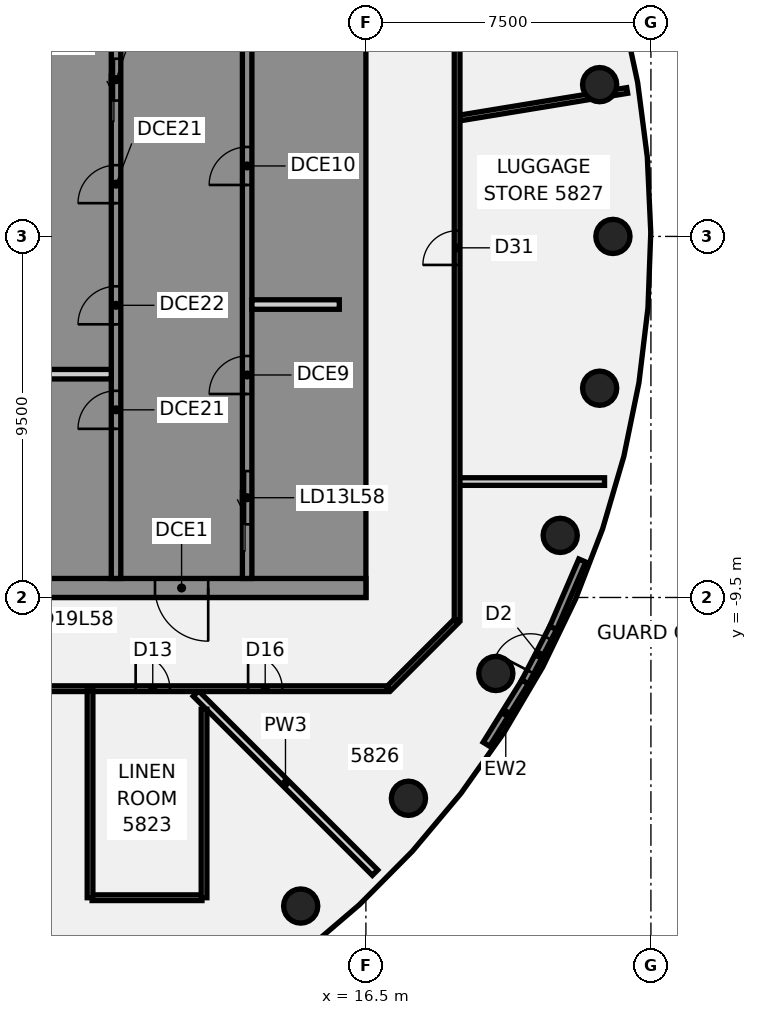
"""IFC4 building model, lengths in metres.
Left out: names, types, materials, properties, quantities, classifications, styles, units other than length and angle.
Written with IfcOpenShell. Run it as: python <this file> out.ifc"""

import sys

from ifc_helpers import new_model, si_unit, direction, frame, frame_2d, origin, origin_2d, place, context, subcontext, project, spatial, polyline, rectangle, circle, outline, extrude, element, fill, save


model = new_model("IFC4")
c1 = context("Model", 3, precision=1e-05, world=origin(), true_north=direction((0.0, 1.0)))
c2 = subcontext(c1, "Body", "Model", "MODEL_VIEW")
j1 = project(units=[si_unit("LENGTHUNIT", "METRE"), si_unit("PLANEANGLEUNIT", "RADIAN")], contexts=[c1])
p1 = place(None, origin())
s1 = spatial("IfcSite", under=j1, at=p1, CompositionType="ELEMENT")
p2 = place(p1, origin())
s2 = spatial("IfcBuilding", under=s1, at=p2, CompositionType="ELEMENT")
p3 = place(p2, frame((0.0, 0.0, 230.7)))
s3 = spatial("IfcBuildingStorey", under=s2, at=p3, CompositionType="ELEMENT", Elevation=230.7)
for number, where, z_axis, x_axis in (
    (1, (23.0, 0.0, -0.14), (0.0, 0.0, 1.0), (1.0, 0.0, 0.0)),
    (2, (22.651, 3.994, -0.14), (0.0, 0.0, 1.0), (1.0, 0.0, 0.0)),
    (3, (14.784, -17.619, -0.14), (0.0, 0.0, 1.0), (1.0, 0.0, 0.0)),
    (4, (17.619, -14.784, -0.14), (0.0, 0.0, 1.0), (1.0, 0.0, 0.0)),
    (5, (19.919, -11.5, -0.14), (0.0, 0.0, 1.0), (1.0, 0.0, 0.0)),
    (6, (21.613, -7.866, -0.14), (0.0, 0.0, 1.0), (1.0, 0.0, 0.0)),
    (7, (22.651, -3.994, -0.14), (0.0, 0.0, 1.0), (1.0, 0.0, 0.0)),
):
    element("IfcColumn", number, at=place(p3, frame(where, z_axis=z_axis, x_axis=x_axis)), inside=s3, PredefinedType="COLUMN", context=c2, shape_type="SweptSolid", body=[
        extrude(circle(Radius=0.45, at=origin_2d()), origin(), (0.0, 0.0, 1.0), 3.6),
    ])
p4 = place(p3, frame((12.027, -12.027, 0.0), z_axis=(0.0, 0.0, 1.0), x_axis=(0.707106781187, -0.707106781187, 0.0)))
e8 = element("IfcWall", 8, at=p4, inside=s3, PredefinedType="PARTITIONING", context=c2, shape_type="SweptSolid", body=[
    extrude(rectangle(XDim=6.665, YDim=0.2, at=frame_2d((3.333, 0.0))), origin(), (0.0, 0.0, 1.0), 2.864),
])
p5 = place(p3, frame((-17.1, -11.9, 0.0), z_axis=(0.0, 0.0, 1.0), x_axis=(1.0, 0.0, 0.0)))
e9 = element("IfcWall", 9, at=p5, inside=s3, PredefinedType="PARTITIONING", context=c2, shape_type="SweptSolid", body=[
    extrude(rectangle(XDim=34.165, YDim=0.15, at=frame_2d((17.083, 0.0))), origin(), (0.0, 0.0, 1.0), 2.864),
])
p6 = place(p5, frame((6.1, 0.0, 0.0)))
e10 = element("IfcOpeningElement", 10, at=p6, cuts=e9, PredefinedType="OPENING", context=c2, shape_type="SweptSolid", body=[
    extrude(rectangle(XDim=0.9, YDim=2.1, at=frame_2d((0.45, 1.05))), frame((0.0, 0.085, 0.0), z_axis=(0.0, -1.0, 0.0), x_axis=(1.0, 0.0, 0.0)), (0.0, 0.0, 1.0), 0.17),
])
p7 = place(p5, frame((27.541, 0.0, 0.0)))
e11 = element("IfcOpeningElement", 11, at=p7, cuts=e9, PredefinedType="OPENING", context=c2, shape_type="SweptSolid", body=[
    extrude(rectangle(XDim=0.9, YDim=2.1, at=frame_2d((0.45, 1.05))), frame((0.0, 0.085, 0.0), z_axis=(0.0, -1.0, 0.0), x_axis=(1.0, 0.0, 0.0)), (0.0, 0.0, 1.0), 0.17),
])
p8 = place(p5, frame((19.152, 0.0, 0.0)))
e12 = element("IfcOpeningElement", 12, at=p8, cuts=e9, PredefinedType="OPENING", context=c2, shape_type="SweptSolid", body=[
    extrude(rectangle(XDim=1.8, YDim=2.1, at=frame_2d((0.9, 1.05))), frame((0.0, 0.085, 0.0), z_axis=(0.0, -1.0, 0.0), x_axis=(1.0, 0.0, 0.0)), (0.0, 0.0, 1.0), 0.17),
])
p9 = place(p5, frame((10.359, 0.0, 0.0)))
e13 = element("IfcOpeningElement", 13, at=p9, cuts=e9, PredefinedType="OPENING", context=c2, shape_type="SweptSolid", body=[
    extrude(rectangle(XDim=1.8, YDim=2.1, at=frame_2d((0.9, 1.05))), frame((0.0, 0.085, 0.0), z_axis=(0.0, -1.0, 0.0), x_axis=(1.0, 0.0, 0.0)), (0.0, 0.0, 1.0), 0.17),
])
p10 = place(p5, frame((30.5, 0.0, 0.0)))
e14 = element("IfcOpeningElement", 14, at=p10, cuts=e9, PredefinedType="OPENING", context=c2, shape_type="SweptSolid", body=[
    extrude(rectangle(XDim=0.9, YDim=2.1, at=frame_2d((0.45, 1.05))), frame((0.0, 0.085, 0.0), z_axis=(0.0, -1.0, 0.0), x_axis=(1.0, 0.0, 0.0)), (0.0, 0.0, 1.0), 0.17),
])
p11 = place(p5, frame((1.65, 0.0, 0.0)))
e15 = element("IfcOpeningElement", 15, at=p11, cuts=e9, PredefinedType="OPENING", context=c2, shape_type="SweptSolid", body=[
    extrude(rectangle(XDim=0.9, YDim=2.1, at=frame_2d((0.45, 1.05))), frame((0.0, 0.085, 0.0), z_axis=(0.0, -1.0, 0.0), x_axis=(1.0, 0.0, 0.0)), (0.0, 0.0, 1.0), 0.17),
])
p12 = place(p3, frame((9.296, -17.4, 0.0), z_axis=(0.0, 0.0, 1.0), x_axis=(1.0, 0.0, 0.0)))
e16 = element("IfcWall", 16, at=p12, inside=s3, PredefinedType="PARTITIONING", context=c2, shape_type="SweptSolid", body=[
    extrude(rectangle(XDim=2.89, YDim=0.15, at=frame_2d((1.445, 0.0))), origin(), (0.0, 0.0, 1.0), 2.864),
])
p13 = place(p3, frame((18.955, -6.45, 0.0), z_axis=(0.0, 0.0, 1.0), x_axis=(1.0, 0.0, 0.0)))
e17 = element("IfcWall", 17, at=p13, inside=s3, PredefinedType="PARTITIONING", context=c2, shape_type="SweptSolid", body=[
    extrude(rectangle(XDim=3.825, YDim=0.2, at=frame_2d((1.912, 0.0))), origin(), (0.0, 0.0, 1.0), 2.864),
])
p14 = place(p3, frame((18.969, 3.116, 0.0), z_axis=(0.0, 0.0, 1.0), x_axis=(0.986773083394, 0.162107624401, 0.0)))
e18 = element("IfcWall", 18, at=p14, inside=s3, PredefinedType="PARTITIONING", context=c2, shape_type="SweptSolid", body=[
    extrude(rectangle(XDim=3.422, YDim=0.15, at=frame_2d((1.711, 0.0))), origin(), (0.0, 0.0, 1.0), 2.864),
])
p15 = place(p3, frame((23.055, 3.787, 0.0), z_axis=(0.0, 0.0, 1.0), x_axis=(0.98681781348, 0.161835110525, 0.0)))
e19 = element("IfcWall", 19, at=p15, inside=s3, PredefinedType="PARTITIONING", context=c2, shape_type="SweptSolid", body=[
    extrude(rectangle(XDim=0.324, YDim=0.15, at=frame_2d((0.162, 0.0))), origin(), (0.0, 0.0, 1.0), 2.864),
])
p16 = place(p3, frame((17.1, -11.9, 0.0), z_axis=(0.0, 0.0, 1.0), x_axis=(0.707106781187, 0.707106781187, 0.0)))
e20 = element("IfcWall", 20, at=p16, inside=s3, PredefinedType="PARTITIONING", context=c2, shape_type="SweptSolid", body=[
    extrude(rectangle(XDim=2.505, YDim=0.15, at=frame_2d((1.253, 0.0))), origin(), (0.0, 0.0, 1.0), 2.864),
])
p17 = place(p3, frame((9.241, -17.4, 0.0), z_axis=(0.0, 0.0, 1.0), x_axis=(0.0, 1.0, 0.0)))
e21 = element("IfcWall", 21, at=p17, inside=s3, PredefinedType="PARTITIONING", context=c2, shape_type="SweptSolid", body=[
    extrude(rectangle(XDim=5.445, YDim=0.15, at=frame_2d((2.722, 0.0))), origin(), (0.0, 0.0, 1.0), 2.864),
])
p18 = place(p3, frame((12.241, -17.4, 0.0), z_axis=(0.0, 0.0, 1.0), x_axis=(0.0, 1.0, 0.0)))
e22 = element("IfcWall", 22, at=p18, inside=s3, PredefinedType="PARTITIONING", context=c2, shape_type="SweptSolid", body=[
    extrude(rectangle(XDim=4.959, YDim=0.15, at=frame_2d((2.479, 0.0))), origin(), (0.0, 0.0, 1.0), 2.864),
])
p19 = place(p3, frame((18.9, -10.1, 0.0), z_axis=(0.0, 0.0, 1.0), x_axis=(0.0, 1.0, 0.0)))
e23 = element("IfcWall", 23, at=p19, inside=s3, PredefinedType="PARTITIONING", context=c2, shape_type="SweptSolid", body=[
    extrude(rectangle(XDim=20.2, YDim=0.15, at=frame_2d((10.1, 0.0))), origin(), (0.0, 0.0, 1.0), 2.864),
])
p20 = place(p19, frame((9.35, 0.0, 0.0)))
e24 = element("IfcOpeningElement", 24, at=p20, cuts=e23, PredefinedType="OPENING", context=c2, shape_type="SweptSolid", body=[
    extrude(rectangle(XDim=0.9, YDim=2.1, at=frame_2d((0.45, 1.05))), frame((0.0, 0.085, 0.0), z_axis=(0.0, -1.0, 0.0), x_axis=(1.0, 0.0, 0.0)), (0.0, 0.0, 1.0), 0.17),
])
p21 = place(p3, frame((19.67, -13.362, 0.0), z_axis=(0.0, 0.0, 1.0), x_axis=(0.527567207866, 0.84951329665, 0.0)))
e25 = element("IfcWall", 25, at=p21, inside=s3, PredefinedType="SOLIDWALL", context=c2, shape_type="SweptSolid", body=[
    extrude(rectangle(XDim=1.933, YDim=0.2, at=frame_2d((0.966, 0.0))), origin(), (0.0, 0.0, 1.0), 3.46),
])
p22 = place(p3, frame((21.428, -10.302, 0.0), z_axis=(0.0, 0.0, 1.0), x_axis=(0.396281143068, 0.918129215116, 0.0)))
e26 = element("IfcWall", 26, at=p22, inside=s3, PredefinedType="SOLIDWALL", context=c2, shape_type="SweptSolid", body=[
    extrude(rectangle(XDim=1.933, YDim=0.2, at=frame_2d((0.966, 0.0))), origin(), (0.0, 0.0, 1.0), 3.46),
])
p23 = place(p3, frame((20.69, -11.72, 0.0), z_axis=(0.0, 0.0, 1.0), x_axis=(0.461328695654, 0.887229302135, 0.0)))
e27 = element("IfcWall", 27, at=p23, inside=s3, PredefinedType="SOLIDWALL", context=c2, shape_type="SweptSolid", body=[
    extrude(rectangle(XDim=1.599, YDim=0.2, at=frame_2d((0.799, 0.0))), origin(), (0.0, 0.0, 1.0), 3.46),
])
p24 = place(p23, frame((0.299, 0.0, 0.0)))
e28 = element("IfcOpeningElement", 28, at=p24, cuts=e27, PredefinedType="OPENING", context=c2, shape_type="SweptSolid", body=[
    extrude(rectangle(XDim=1.0, YDim=2.4, at=frame_2d((0.5, 1.2))), frame((0.0, 0.11, 0.0), z_axis=(0.0, -1.0, 0.0), x_axis=(1.0, 0.0, 0.0)), (0.0, 0.0, 1.0), 0.22),
])
p25 = place(p3, frame((16.5, -9.25, 0.0), z_axis=(0.0, 0.0, 1.0), x_axis=(-1.0, 0.0, 0.0)))
e29 = element("IfcWall", 29, at=p25, inside=s3, PredefinedType="SHEAR", context=c2, shape_type="SweptSolid", body=[
    extrude(rectangle(XDim=13.0, YDim=0.5, at=frame_2d((6.5, 0.0))), origin(), (0.0, 0.0, 1.0), 3.46),
])
p26 = place(p25, frame((4.15, 0.0, 0.0)))
e30 = element("IfcOpeningElement", 30, at=p26, cuts=e29, PredefinedType="OPENING", context=c2, shape_type="SweptSolid", body=[
    extrude(rectangle(XDim=1.4, YDim=2.1, at=frame_2d((0.7, 1.05))), frame((0.0, 0.26, 0.0), z_axis=(0.0, -1.0, 0.0), x_axis=(1.0, 0.0, 0.0)), (0.0, 0.0, 1.0), 0.52),
])
p27 = place(p25, frame((10.125, 0.0, 0.0)))
e31 = element("IfcOpeningElement", 31, at=p27, cuts=e29, PredefinedType="OPENING", context=c2, shape_type="SweptSolid", body=[
    extrude(rectangle(XDim=1.4, YDim=2.1, at=frame_2d((0.7, 1.05))), frame((0.0, 0.26, 0.0), z_axis=(0.0, -1.0, 0.0), x_axis=(1.0, 0.0, 0.0)), (0.0, 0.0, 1.0), 0.52),
])
p28 = place(p3, origin())
e32 = element("IfcWall", 32, at=p28, inside=s3, PredefinedType="SHEAR", context=c2, shape_type="SweptSolid", body=[
    extrude(outline(polyline([(13.5, -8.125), (13.5, -9.0), (16.0, -9.0), (16.5, -9.0), (16.5, 9.0), (16.0, 9.0), (13.5, 9.0), (13.5, 8.125), (16.0, 8.125), (16.0, 5.625), (13.5, 5.625), (13.5, 5.375), (16.0, 5.375), (16.0, -5.375), (13.5, -5.375), (13.5, -5.625), (16.0, -5.625), (16.0, -8.125), (13.5, -8.125)])), origin(), (0.0, 0.0, 1.0), 3.46),
])
p29 = place(p3, origin())
e33 = element("IfcWall", 33, at=p29, inside=s3, PredefinedType="SHEAR", context=c2, shape_type="SweptSolid", body=[
    extrude(outline(polyline([(9.8, -5.375), (7.5, -5.375), (7.5, 2.625), (9.8, 2.625), (9.8, 2.875), (7.5, 2.875), (7.5, 5.375), (9.8, 5.375), (9.8, 5.625), (7.5, 5.625), (7.5, 8.125), (9.8, 8.125), (9.8, 9.0), (7.5, 9.0), (7.25, 9.0), (7.25, -5.625), (7.5, -5.625), (9.8, -5.625), (9.8, -5.375)])), origin(), (0.0, 0.0, 1.0), 3.46),
])
p30 = place(p3, origin())
e34 = element("IfcWall", 34, at=p30, inside=s3, PredefinedType="SHEAR", context=c2, shape_type="SweptSolid", body=[
    extrude(outline(polyline([(7.5, -8.125), (7.5, -9.0), (9.8, -9.0), (9.8, -8.125), (9.8, -5.625), (9.55, -5.625), (9.55, -8.125), (7.5, -8.125)])), origin(), (0.0, 0.0, 1.0), 3.46),
])
p31 = place(p3, frame((13.375, -9.0, 0.0), z_axis=(0.0, 0.0, 1.0), x_axis=(0.0, 1.0, 0.0)))
e35 = element("IfcWall", 35, at=p31, inside=s3, PredefinedType="SHEAR", context=c2, shape_type="SweptSolid", body=[
    extrude(rectangle(XDim=18.0, YDim=0.25, at=frame_2d((9.0, 0.0))), origin(), (0.0, 0.0, 1.0), 3.46),
])
p32 = place(p31, frame((1.425, 0.0, 0.0)))
e36 = element("IfcOpeningElement", 36, at=p32, cuts=e35, PredefinedType="OPENING", context=c2, shape_type="SweptSolid", body=[
    extrude(rectangle(XDim=1.4, YDim=2.1, at=frame_2d((0.7, 1.05))), frame((0.0, 0.135, 0.0), z_axis=(0.0, -1.0, 0.0), x_axis=(1.0, 0.0, 0.0)), (0.0, 0.0, 1.0), 0.27),
])
p33 = place(p31, frame((4.854, 0.0, 0.0)))
e37 = element("IfcOpeningElement", 37, at=p33, cuts=e35, PredefinedType="OPENING", context=c2, shape_type="SweptSolid", body=[
    extrude(rectangle(XDim=1.0, YDim=2.1, at=frame_2d((0.5, 1.05))), frame((0.0, 0.135, 0.0), z_axis=(0.0, -1.0, 0.0), x_axis=(1.0, 0.0, 0.0)), (0.0, 0.0, 1.0), 0.27),
])
p34 = place(p31, frame((10.354, 0.0, 0.0)))
e38 = element("IfcOpeningElement", 38, at=p34, cuts=e35, PredefinedType="OPENING", context=c2, shape_type="SweptSolid", body=[
    extrude(rectangle(XDim=1.0, YDim=2.1, at=frame_2d((0.5, 1.05))), frame((0.0, 0.135, 0.0), z_axis=(0.0, -1.0, 0.0), x_axis=(1.0, 0.0, 0.0)), (0.0, 0.0, 1.0), 0.27),
])
p35 = place(p3, frame((9.925, -9.0, 0.0), z_axis=(0.0, 0.0, 1.0), x_axis=(0.0, 1.0, 0.0)))
e39 = element("IfcWall", 39, at=p35, inside=s3, PredefinedType="SHEAR", context=c2, shape_type="SweptSolid", body=[
    extrude(rectangle(XDim=18.0, YDim=0.25, at=frame_2d((9.0, 0.0))), origin(), (0.0, 0.0, 1.0), 3.46),
])
p36 = place(p35, frame((12.575, 0.0, 0.0)))
e40 = element("IfcOpeningElement", 40, at=p36, cuts=e39, PredefinedType="OPENING", context=c2, shape_type="SweptSolid", body=[
    extrude(rectangle(XDim=1.1, YDim=2.1, at=frame_2d((0.55, 1.05))), frame((0.0, 0.135, 0.0), z_axis=(0.0, -1.0, 0.0), x_axis=(1.0, 0.0, 0.0)), (0.0, 0.0, 1.0), 0.27),
])
p37 = place(p35, frame((15.325, 0.0, 0.0)))
e41 = element("IfcOpeningElement", 41, at=p37, cuts=e39, PredefinedType="OPENING", context=c2, shape_type="SweptSolid", body=[
    extrude(rectangle(XDim=1.1, YDim=2.1, at=frame_2d((0.55, 1.05))), frame((0.0, 0.135, 0.0), z_axis=(0.0, -1.0, 0.0), x_axis=(1.0, 0.0, 0.0)), (0.0, 0.0, 1.0), 0.27),
])
p38 = place(p35, frame((3.938, 0.0, 0.0)))
e42 = element("IfcOpeningElement", 42, at=p38, cuts=e39, PredefinedType="OPENING", context=c2, shape_type="SweptSolid", body=[
    extrude(rectangle(XDim=1.0, YDim=2.1, at=frame_2d((0.5, 1.05))), frame((0.0, 0.135, 0.0), z_axis=(0.0, -1.0, 0.0), x_axis=(1.0, 0.0, 0.0)), (0.0, 0.0, 1.0), 0.27),
])
p39 = place(p35, frame((6.688, 0.0, 0.0)))
e43 = element("IfcOpeningElement", 43, at=p39, cuts=e39, PredefinedType="OPENING", context=c2, shape_type="SweptSolid", body=[
    extrude(rectangle(XDim=1.0, YDim=2.1, at=frame_2d((0.5, 1.05))), frame((0.0, 0.135, 0.0), z_axis=(0.0, -1.0, 0.0), x_axis=(1.0, 0.0, 0.0)), (0.0, 0.0, 1.0), 0.27),
])
p40 = place(p35, frame((9.875, 0.0, 0.0)))
e44 = element("IfcOpeningElement", 44, at=p40, cuts=e39, PredefinedType="OPENING", context=c2, shape_type="SweptSolid", body=[
    extrude(rectangle(XDim=1.0, YDim=2.1, at=frame_2d((0.5, 1.05))), frame((0.0, 0.135, 0.0), z_axis=(0.0, -1.0, 0.0), x_axis=(1.0, 0.0, 0.0)), (0.0, 0.0, 1.0), 0.27),
])
for number, where, z_axis, x_axis in (
    (45, (15.8, -1.792, 0.0), (0.0, 0.0, 1.0), (-1.0, 0.0, 0.0)),
    (46, (9.8, -3.625, 0.0), (0.0, 0.0, 1.0), (-1.0, 0.0, 0.0)),
):
    element("IfcWall", number, at=place(p3, frame(where, z_axis=z_axis, x_axis=x_axis)), inside=s3, PredefinedType="PARTITIONING", context=c2, shape_type="SweptSolid", body=[
        extrude(rectangle(XDim=2.3, YDim=0.25, at=frame_2d((1.15, 0.0))), origin(), (0.0, 0.0, 1.0), 3.46),
    ])
p41 = place(p7, frame((0.9, 0.0, 0.0), z_axis=(0.0, 0.0, 1.0), x_axis=(-1.0, 0.0, 0.0)))
e47 = element("IfcDoor", 47, at=p41, inside=s3, OperationType="SINGLE_SWING_RIGHT", PredefinedType="DOOR", context=c2, shape_type="SweptSolid", body=[
    extrude(rectangle(XDim=0.9, YDim=2.1, at=frame_2d((0.45, 1.05))), frame((0.0, 0.025, 0.0), z_axis=(0.0, -1.0, 0.0), x_axis=(1.0, 0.0, 0.0)), (0.0, 0.0, 1.0), 0.05),
])
fill(e11, e47)
p42 = place(p10, frame((0.9, 0.0, 0.0), z_axis=(0.0, 0.0, 1.0), x_axis=(-1.0, 0.0, 0.0)))
e48 = element("IfcDoor", 48, at=p42, inside=s3, OperationType="SINGLE_SWING_RIGHT", PredefinedType="DOOR", context=c2, shape_type="SweptSolid", body=[
    extrude(rectangle(XDim=0.9, YDim=2.1, at=frame_2d((0.45, 1.05))), frame((0.0, 0.025, 0.0), z_axis=(0.0, -1.0, 0.0), x_axis=(1.0, 0.0, 0.0)), (0.0, 0.0, 1.0), 0.05),
])
fill(e14, e48)
p43 = place(p20, frame((0.9, 0.0, 0.0), z_axis=(0.0, 0.0, 1.0), x_axis=(-1.0, 0.0, 0.0)))
e49 = element("IfcDoor", 49, at=p43, inside=s3, OperationType="SINGLE_SWING_LEFT", PredefinedType="DOOR", context=c2, shape_type="SweptSolid", body=[
    extrude(rectangle(XDim=0.9, YDim=2.1, at=frame_2d((0.45, 1.05))), frame((0.0, 0.025, 0.0), z_axis=(0.0, -1.0, 0.0), x_axis=(1.0, 0.0, 0.0)), (0.0, 0.0, 1.0), 0.05),
])
fill(e24, e49)
p44 = place(p24, origin())
e50 = element("IfcDoor", 50, at=p44, inside=s3, OperationType="SINGLE_SWING_LEFT", PredefinedType="DOOR", context=c2, shape_type="SweptSolid", body=[
    extrude(rectangle(XDim=1.0, YDim=2.4, at=frame_2d((0.5, 1.2))), frame((0.0, 0.025, 0.0), z_axis=(0.0, -1.0, 0.0), x_axis=(1.0, 0.0, 0.0)), (0.0, 0.0, 1.0), 0.05),
])
fill(e28, e50)
p45 = place(p26, origin())
e51 = element("IfcDoor", 51, at=p45, inside=s3, OperationType="SINGLE_SWING_LEFT", PredefinedType="DOOR", context=c2, shape_type="SweptSolid", body=[
    extrude(rectangle(XDim=1.4, YDim=2.1, at=frame_2d((0.7, 1.05))), frame((0.0, 0.025, 0.0), z_axis=(0.0, -1.0, 0.0), x_axis=(1.0, 0.0, 0.0)), (0.0, 0.0, 1.0), 0.05),
])
fill(e30, e51)
p46 = place(p32, origin())
e52 = element("IfcDoor", 52, at=p46, inside=s3, OperationType="SLIDING_TO_LEFT", PredefinedType="DOOR", context=c2, shape_type="SweptSolid", body=[
    extrude(rectangle(XDim=1.4, YDim=2.1, at=frame_2d((0.7, 1.05))), frame((0.0, 0.025, 0.0), z_axis=(0.0, -1.0, 0.0), x_axis=(1.0, 0.0, 0.0)), (0.0, 0.0, 1.0), 0.05),
])
fill(e36, e52)
p47 = place(p36, origin())
e53 = element("IfcDoor", 53, at=p47, inside=s3, OperationType="SLIDING_TO_LEFT", PredefinedType="DOOR", context=c2, shape_type="SweptSolid", body=[
    extrude(rectangle(XDim=1.1, YDim=2.1, at=frame_2d((0.55, 1.05))), frame((0.0, 0.025, 0.0), z_axis=(0.0, -1.0, 0.0), x_axis=(1.0, 0.0, 0.0)), (0.0, 0.0, 1.0), 0.05),
])
fill(e40, e53)
p48 = place(p33, origin())
e54 = element("IfcDoor", 54, at=p48, inside=s3, OperationType="SINGLE_SWING_LEFT", PredefinedType="DOOR", context=c2, shape_type="SweptSolid", body=[
    extrude(rectangle(XDim=1.0, YDim=2.1, at=frame_2d((0.5, 1.05))), frame((0.0, 0.025, 0.0), z_axis=(0.0, -1.0, 0.0), x_axis=(1.0, 0.0, 0.0)), (0.0, 0.0, 1.0), 0.05),
])
fill(e37, e54)
p49 = place(p34, origin())
e55 = element("IfcDoor", 55, at=p49, inside=s3, OperationType="SINGLE_SWING_LEFT", PredefinedType="DOOR", context=c2, shape_type="SweptSolid", body=[
    extrude(rectangle(XDim=1.0, YDim=2.1, at=frame_2d((0.5, 1.05))), frame((0.0, 0.025, 0.0), z_axis=(0.0, -1.0, 0.0), x_axis=(1.0, 0.0, 0.0)), (0.0, 0.0, 1.0), 0.05),
])
fill(e38, e55)
p50 = place(p38, origin())
e56 = element("IfcDoor", 56, at=p50, inside=s3, OperationType="SINGLE_SWING_LEFT", PredefinedType="DOOR", context=c2, shape_type="SweptSolid", body=[
    extrude(rectangle(XDim=1.0, YDim=2.1, at=frame_2d((0.5, 1.05))), frame((0.0, 0.025, 0.0), z_axis=(0.0, -1.0, 0.0), x_axis=(1.0, 0.0, 0.0)), (0.0, 0.0, 1.0), 0.05),
])
fill(e42, e56)
p51 = place(p39, origin())
e57 = element("IfcDoor", 57, at=p51, inside=s3, OperationType="SINGLE_SWING_LEFT", PredefinedType="DOOR", context=c2, shape_type="SweptSolid", body=[
    extrude(rectangle(XDim=1.0, YDim=2.1, at=frame_2d((0.5, 1.05))), frame((0.0, 0.025, 0.0), z_axis=(0.0, -1.0, 0.0), x_axis=(1.0, 0.0, 0.0)), (0.0, 0.0, 1.0), 0.05),
])
fill(e43, e57)
p52 = place(p40, origin())
e58 = element("IfcDoor", 58, at=p52, inside=s3, OperationType="SINGLE_SWING_LEFT", PredefinedType="DOOR", context=c2, shape_type="SweptSolid", body=[
    extrude(rectangle(XDim=1.0, YDim=2.1, at=frame_2d((0.5, 1.05))), frame((0.0, 0.025, 0.0), z_axis=(0.0, -1.0, 0.0), x_axis=(1.0, 0.0, 0.0)), (0.0, 0.0, 1.0), 0.05),
])
fill(e44, e58)
save(model, sys.argv[1])
